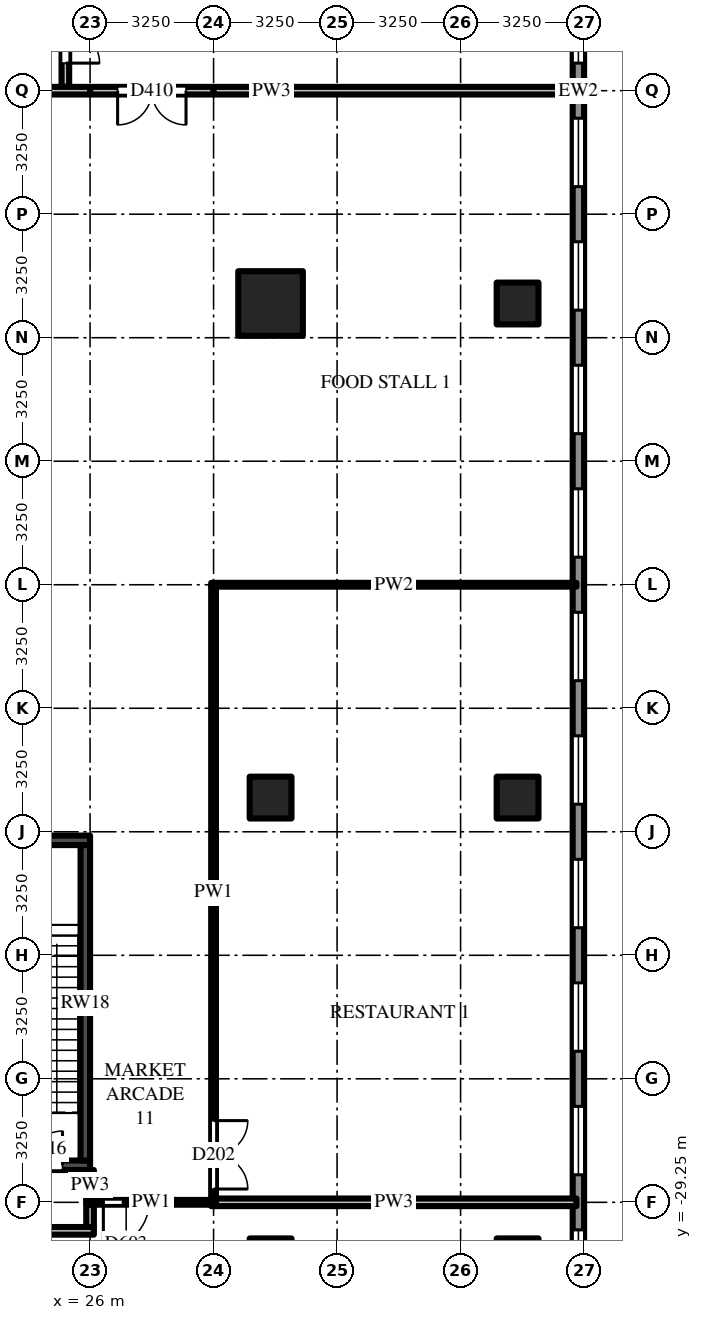
"""IFC4 building model, lengths in metres.
Left out: names, types, materials, properties, quantities, classifications, styles, units other than length and angle.
Written with IfcOpenShell. Run it as: python <this file> out.ifc"""

import sys

from ifc_helpers import new_model, si_unit, direction, frame, frame_2d, origin, origin_2d, place, context, subcontext, project, spatial, rectangle, extrude, source, transform, mapped, element, fill, save


model = new_model("IFC4")
c1 = context("Model", 3, precision=1e-05, world=origin(), true_north=direction((0.0, 1.0)))
c2 = subcontext(c1, "Body", "Model", "MODEL_VIEW")
j1 = project(units=[si_unit("LENGTHUNIT", "METRE"), si_unit("PLANEANGLEUNIT", "RADIAN")], contexts=[c1])
p1 = place(None, origin())
s1 = spatial("IfcSite", under=j1, at=p1, CompositionType="ELEMENT")
p2 = place(p1, origin())
s2 = spatial("IfcBuilding", under=s1, at=p2, CompositionType="ELEMENT")
p3 = place(p2, frame((0.0, 0.0, 14.0)))
s3 = spatial("IfcBuildingStorey", under=s2, at=p3, CompositionType="ELEMENT", Elevation=14.0)
m1 = source(origin(), c2, "Body", "SweptSolid", [
    extrude(rectangle(XDim=1.7, YDim=1.7, at=origin_2d()), origin(), (0.0, 0.0, 1.0), 5.0),
])
p4 = place(p3, frame((30.75, -5.6, 0.0), z_axis=(0.0, 0.0, 1.0), x_axis=(1.0, 0.0, 0.0)))
e1 = element("IfcColumn", 1, at=p4, inside=s3, PredefinedType="COLUMN", context=c2, shape_type="MappedRepresentation", body=[
    mapped(m1, transform((0.0, 0.0, 0.0))),
])
m2 = source(origin(), c2, "Body", "SweptSolid", [
    extrude(rectangle(XDim=1.1, YDim=1.1, at=origin_2d()), origin(), (0.0, 0.0, 1.0), 5.0),
])
for number, where, z_axis, x_axis in (
    (2, (30.75, -18.6, 0.0), (0.0, 0.0, 1.0), (1.0, 0.0, 0.0)),
    (3, (30.75, -30.75, 0.0), (0.0, 0.0, 1.0), (1.0, 0.0, 0.0)),
    (4, (37.25, -5.6, 0.0), (0.0, 0.0, 1.0), (1.0, 0.0, 0.0)),
    (5, (37.25, -18.6, 0.0), (0.0, 0.0, 1.0), (1.0, 0.0, 0.0)),
    (6, (37.25, -30.75, 0.0), (0.0, 0.0, 1.0), (1.0, 0.0, 0.0)),
):
    element("IfcColumn", number, at=place(p3, frame(where, z_axis=z_axis, x_axis=x_axis)), inside=s3, PredefinedType="COLUMN", context=c2, shape_type="MappedRepresentation", body=[
        mapped(m2, transform((0.0, 0.0, 0.0))),
    ])
m3 = source(origin(), c2, "Body", "SweptSolid", [
    extrude(rectangle(XDim=6.5, YDim=0.25, at=frame_2d((3.25, 0.0))), origin(), (0.0, 0.0, 1.0), 4.7),
])
p5 = place(p3, frame((19.5, -28.275, 0.0), z_axis=(0.0, 0.0, 1.0), x_axis=(1.0, 0.0, 0.0)))
e7 = element("IfcWall", 7, at=p5, inside=s3, PredefinedType="SHEAR", context=c2, shape_type="MappedRepresentation", body=[
    mapped(m3, transform((0.0, 0.0, 0.0))),
])
m4 = source(origin(), c2, "Body", "SweptSolid", [
    extrude(rectangle(XDim=1.8, YDim=2.1, at=frame_2d((0.9, 1.05))), frame((0.0, 0.135, 0.0), z_axis=(0.0, -1.0, 0.0), x_axis=(1.0, 0.0, 0.0)), (0.0, 0.0, 1.0), 0.27),
])
p6 = place(p5, frame((0.725, 0.0, 0.0)))
e8 = element("IfcOpeningElement", 8, at=p6, cuts=e7, PredefinedType="OPENING", context=c2, shape_type="MappedRepresentation", body=[
    mapped(m4, transform((0.0, 0.0, 0.0))),
])
p7 = place(p5, frame((3.975, 0.0, 0.0)))
e9 = element("IfcOpeningElement", 9, at=p7, cuts=e7, PredefinedType="OPENING", context=c2, shape_type="MappedRepresentation", body=[
    mapped(m4, transform((0.0, 0.0, 0.0))),
])
p8 = place(p3, frame((19.5, -19.725, 0.0), z_axis=(0.0, 0.0, 1.0), x_axis=(1.0, 0.0, 0.0)))
e10 = element("IfcWall", 10, at=p8, inside=s3, PredefinedType="SHEAR", context=c2, shape_type="MappedRepresentation", body=[
    mapped(m3, transform((0.0, 0.0, 0.0))),
])
m5 = source(origin(), c2, "Body", "SweptSolid", [
    extrude(rectangle(XDim=8.3, YDim=0.25, at=frame_2d((4.15, 0.0))), origin(), (0.0, 0.0, 1.0), 4.7),
])
p9 = place(p3, frame((25.875, -28.15, 0.0), z_axis=(0.0, 0.0, 1.0), x_axis=(0.0, 1.0, 0.0)))
e11 = element("IfcWall", 11, at=p9, inside=s3, PredefinedType="SHEAR", context=c2, shape_type="MappedRepresentation", body=[
    mapped(m5, transform((0.0, 0.0, 0.0))),
])
m6 = source(origin(), c2, "Body", "SweptSolid", [
    extrude(rectangle(XDim=71.5, YDim=0.3, at=frame_2d((35.75, 0.0))), origin(), (0.0, 0.0, 1.0), 4.7),
])
p10 = place(p3, frame((38.85, -35.75, 0.0), z_axis=(0.0, 0.0, 1.0), x_axis=(0.0, 1.0, 0.0)))
e12 = element("IfcWall", 12, at=p10, inside=s3, PredefinedType="SOLIDWALL", context=c2, shape_type="MappedRepresentation", body=[
    mapped(m6, transform((0.0, 0.0, 0.0))),
])
m7 = source(origin(), c2, "Body", "SweptSolid", [
    extrude(rectangle(XDim=1.8, YDim=3.0, at=frame_2d((0.9, 1.5))), frame((0.0, 0.16, 0.0), z_axis=(0.0, -1.0, 0.0), x_axis=(1.0, 0.0, 0.0)), (0.0, 0.0, 1.0), 0.32),
])
p11 = place(p10, frame((0.725, 0.0, 0.9)))
e13 = element("IfcOpeningElement", 13, at=p11, cuts=e12, PredefinedType="OPENING", context=c2, shape_type="MappedRepresentation", body=[
    mapped(m7, transform((0.0, 0.0, 0.0))),
])
p12 = place(p10, frame((3.975, 0.0, 0.9)))
e14 = element("IfcOpeningElement", 14, at=p12, cuts=e12, PredefinedType="OPENING", context=c2, shape_type="MappedRepresentation", body=[
    mapped(m7, transform((0.0, 0.0, 0.0))),
])
p13 = place(p10, frame((7.225, 0.0, 0.9)))
e15 = element("IfcOpeningElement", 15, at=p13, cuts=e12, PredefinedType="OPENING", context=c2, shape_type="MappedRepresentation", body=[
    mapped(m7, transform((0.0, 0.0, 0.0))),
])
p14 = place(p10, frame((10.475, 0.0, 0.9)))
e16 = element("IfcOpeningElement", 16, at=p14, cuts=e12, PredefinedType="OPENING", context=c2, shape_type="MappedRepresentation", body=[
    mapped(m7, transform((0.0, 0.0, 0.0))),
])
p15 = place(p10, frame((13.725, 0.0, 0.9)))
e17 = element("IfcOpeningElement", 17, at=p15, cuts=e12, PredefinedType="OPENING", context=c2, shape_type="MappedRepresentation", body=[
    mapped(m7, transform((0.0, 0.0, 0.0))),
])
p16 = place(p10, frame((16.975, 0.0, 0.9)))
e18 = element("IfcOpeningElement", 18, at=p16, cuts=e12, PredefinedType="OPENING", context=c2, shape_type="MappedRepresentation", body=[
    mapped(m7, transform((0.0, 0.0, 0.0))),
])
p17 = place(p10, frame((20.225, 0.0, 0.9)))
e19 = element("IfcOpeningElement", 19, at=p17, cuts=e12, PredefinedType="OPENING", context=c2, shape_type="MappedRepresentation", body=[
    mapped(m7, transform((0.0, 0.0, 0.0))),
])
p18 = place(p10, frame((23.475, 0.0, 0.9)))
e20 = element("IfcOpeningElement", 20, at=p18, cuts=e12, PredefinedType="OPENING", context=c2, shape_type="MappedRepresentation", body=[
    mapped(m7, transform((0.0, 0.0, 0.0))),
])
p19 = place(p10, frame((26.725, 0.0, 0.9)))
e21 = element("IfcOpeningElement", 21, at=p19, cuts=e12, PredefinedType="OPENING", context=c2, shape_type="MappedRepresentation", body=[
    mapped(m7, transform((0.0, 0.0, 0.0))),
])
p20 = place(p10, frame((29.975, 0.0, 0.9)))
e22 = element("IfcOpeningElement", 22, at=p20, cuts=e12, PredefinedType="OPENING", context=c2, shape_type="MappedRepresentation", body=[
    mapped(m7, transform((0.0, 0.0, 0.0))),
])
p21 = place(p10, frame((33.225, 0.0, 0.9)))
e23 = element("IfcOpeningElement", 23, at=p21, cuts=e12, PredefinedType="OPENING", context=c2, shape_type="MappedRepresentation", body=[
    mapped(m7, transform((0.0, 0.0, 0.0))),
])
p22 = place(p10, frame((36.475, 0.0, 0.9)))
e24 = element("IfcOpeningElement", 24, at=p22, cuts=e12, PredefinedType="OPENING", context=c2, shape_type="MappedRepresentation", body=[
    mapped(m7, transform((0.0, 0.0, 0.0))),
])
p23 = place(p10, frame((39.725, 0.0, 0.9)))
e25 = element("IfcOpeningElement", 25, at=p23, cuts=e12, PredefinedType="OPENING", context=c2, shape_type="MappedRepresentation", body=[
    mapped(m7, transform((0.0, 0.0, 0.0))),
])
p24 = place(p10, frame((42.975, 0.0, 0.9)))
e26 = element("IfcOpeningElement", 26, at=p24, cuts=e12, PredefinedType="OPENING", context=c2, shape_type="MappedRepresentation", body=[
    mapped(m7, transform((0.0, 0.0, 0.0))),
])
p25 = place(p10, frame((46.225, 0.0, 0.9)))
e27 = element("IfcOpeningElement", 27, at=p25, cuts=e12, PredefinedType="OPENING", context=c2, shape_type="MappedRepresentation", body=[
    mapped(m7, transform((0.0, 0.0, 0.0))),
])
p26 = place(p10, frame((49.475, 0.0, 0.9)))
e28 = element("IfcOpeningElement", 28, at=p26, cuts=e12, PredefinedType="OPENING", context=c2, shape_type="MappedRepresentation", body=[
    mapped(m7, transform((0.0, 0.0, 0.0))),
])
p27 = place(p10, frame((52.725, 0.0, 0.9)))
e29 = element("IfcOpeningElement", 29, at=p27, cuts=e12, PredefinedType="OPENING", context=c2, shape_type="MappedRepresentation", body=[
    mapped(m7, transform((0.0, 0.0, 0.0))),
])
p28 = place(p10, frame((55.975, 0.0, 0.9)))
e30 = element("IfcOpeningElement", 30, at=p28, cuts=e12, PredefinedType="OPENING", context=c2, shape_type="MappedRepresentation", body=[
    mapped(m7, transform((0.0, 0.0, 0.0))),
])
p29 = place(p10, frame((59.225, 0.0, 0.9)))
e31 = element("IfcOpeningElement", 31, at=p29, cuts=e12, PredefinedType="OPENING", context=c2, shape_type="MappedRepresentation", body=[
    mapped(m7, transform((0.0, 0.0, 0.0))),
])
p30 = place(p10, frame((62.475, 0.0, 0.9)))
e32 = element("IfcOpeningElement", 32, at=p30, cuts=e12, PredefinedType="OPENING", context=c2, shape_type="MappedRepresentation", body=[
    mapped(m7, transform((0.0, 0.0, 0.0))),
])
p31 = place(p10, frame((65.725, 0.0, 0.9)))
e33 = element("IfcOpeningElement", 33, at=p31, cuts=e12, PredefinedType="OPENING", context=c2, shape_type="MappedRepresentation", body=[
    mapped(m7, transform((0.0, 0.0, 0.0))),
])
p32 = place(p10, frame((68.975, 0.0, 0.9)))
e34 = element("IfcOpeningElement", 34, at=p32, cuts=e12, PredefinedType="OPENING", context=c2, shape_type="MappedRepresentation", body=[
    mapped(m7, transform((0.0, 0.0, 0.0))),
])
m8 = source(origin(), c2, "Body", "SweptSolid", [
    extrude(rectangle(XDim=3.05, YDim=0.2, at=frame_2d((1.525, 0.0))), origin(), (0.0, 0.0, 1.0), 4.077),
])
p33 = place(p3, frame((25.35, 3.15, 0.0), z_axis=(0.0, 0.0, 1.0), x_axis=(0.0, -1.0, 0.0)))
e35 = element("IfcWall", 35, at=p33, inside=s3, PredefinedType="PARTITIONING", context=c2, shape_type="MappedRepresentation", body=[
    mapped(m8, transform((0.0, 0.0, 0.0))),
])
m9 = source(origin(), c2, "Body", "SweptSolid", [
    extrude(rectangle(XDim=1.8, YDim=2.1, at=frame_2d((0.9, 1.05))), frame((0.0, 0.11, 0.0), z_axis=(0.0, -1.0, 0.0), x_axis=(1.0, 0.0, 0.0)), (0.0, 0.0, 1.0), 0.22),
])
p34 = place(p33, frame((0.625, 0.0, 0.0)))
e36 = element("IfcOpeningElement", 36, at=p34, cuts=e35, PredefinedType="OPENING", context=c2, shape_type="MappedRepresentation", body=[
    mapped(m9, transform((0.0, 0.0, 0.0))),
])
m10 = source(origin(), c2, "Body", "SweptSolid", [
    extrude(rectangle(XDim=0.788, YDim=0.2, at=frame_2d((0.394, 0.0))), origin(), (0.0, 0.0, 1.0), 4.7),
])
p35 = place(p3, frame((26.0, -29.188, 0.0), z_axis=(0.0, 0.0, 1.0), x_axis=(0.0, 1.0, 0.0)))
e37 = element("IfcWall", 37, at=p35, inside=s3, PredefinedType="PARTITIONING", context=c2, shape_type="MappedRepresentation", body=[
    mapped(m10, transform((0.0, 0.0, 0.0))),
])
m11 = source(origin(), c2, "Body", "SweptSolid", [
    extrude(rectangle(XDim=0.587, YDim=0.2, at=frame_2d((0.294, 0.0))), origin(), (0.0, 0.0, 1.0), 4.7),
])
p36 = place(p3, frame((26.0, -29.312, 0.0), z_axis=(0.0, 0.0, 1.0), x_axis=(0.0, -1.0, 0.0)))
e38 = element("IfcWall", 38, at=p36, inside=s3, PredefinedType="PARTITIONING", context=c2, shape_type="MappedRepresentation", body=[
    mapped(m11, transform((0.0, 0.0, 0.0))),
])
p37 = place(p3, frame((29.25, -13.05, 0.0), z_axis=(0.0, 0.0, 1.0), x_axis=(0.0, -1.0, 0.0)))
e39 = element("IfcWall", 39, at=p37, inside=s3, PredefinedType="PARTITIONING", context=c2, shape_type="SweptSolid", body=[
    extrude(rectangle(XDim=16.1, YDim=0.125, at=frame_2d((8.05, 0.0))), origin(), (0.0, 0.0, 1.0), 3.762),
])
m12 = source(origin(), c2, "Body", "SweptSolid", [
    extrude(rectangle(XDim=1.8, YDim=2.1, at=frame_2d((0.9, 1.05))), frame((0.0, 0.073, 0.0), z_axis=(0.0, -1.0, 0.0), x_axis=(1.0, 0.0, 0.0)), (0.0, 0.0, 1.0), 0.145),
])
p38 = place(p37, frame((14.05, 0.0, 0.0)))
e40 = element("IfcOpeningElement", 40, at=p38, cuts=e39, PredefinedType="OPENING", context=c2, shape_type="MappedRepresentation", body=[
    mapped(m12, transform((0.0, 0.0, 0.0))),
])
m13 = source(origin(), c2, "Body", "SweptSolid", [
    extrude(rectangle(XDim=8.2, YDim=0.2, at=frame_2d((4.1, 0.0))), origin(), (0.0, 0.0, 1.0), 3.762),
])
p39 = place(p3, frame((26.1, -30.0, 0.0), z_axis=(0.0, 0.0, 1.0), x_axis=(-1.0, 0.0, 0.0)))
e41 = element("IfcWall", 41, at=p39, inside=s3, PredefinedType="PARTITIONING", context=c2, shape_type="MappedRepresentation", body=[
    mapped(m13, transform((0.0, 0.0, 0.0))),
])
m14 = source(origin(), c2, "Body", "SweptSolid", [
    extrude(rectangle(XDim=9.613, YDim=0.2, at=frame_2d((4.806, 0.0))), origin(), (0.0, 0.0, 1.0), 3.762),
])
p40 = place(p3, frame((29.188, -29.25, 0.0), z_axis=(0.0, 0.0, 1.0), x_axis=(1.0, 0.0, 0.0)))
e42 = element("IfcWall", 42, at=p40, inside=s3, PredefinedType="PARTITIONING", context=c2, shape_type="MappedRepresentation", body=[
    mapped(m14, transform((0.0, 0.0, 0.0))),
])
m15 = source(origin(), c2, "Body", "SweptSolid", [
    extrude(rectangle(XDim=3.413, YDim=0.125, at=frame_2d((1.706, 0.0))), origin(), (0.0, 0.0, 1.0), 4.7),
])
p41 = place(p3, frame((29.312, -29.25, 0.0), z_axis=(0.0, 0.0, 1.0), x_axis=(-1.0, 0.0, 0.0)))
e43 = element("IfcWall", 43, at=p41, inside=s3, PredefinedType="PARTITIONING", context=c2, shape_type="MappedRepresentation", body=[
    mapped(m15, transform((0.0, 0.0, 0.0))),
])
m16 = source(origin(), c2, "Body", "SweptSolid", [
    extrude(rectangle(XDim=1.2, YDim=2.1, at=frame_2d((0.6, 1.05))), frame((0.0, 0.073, 0.0), z_axis=(0.0, -1.0, 0.0), x_axis=(1.0, 0.0, 0.0)), (0.0, 0.0, 1.0), 0.145),
])
p42 = place(p41, frame((1.762, 0.0, 0.0)))
e44 = element("IfcOpeningElement", 44, at=p42, cuts=e43, PredefinedType="OPENING", context=c2, shape_type="MappedRepresentation", body=[
    mapped(m16, transform((0.0, 0.0, 0.0))),
])
m17 = source(origin(), c2, "Body", "SweptSolid", [
    extrude(rectangle(XDim=9.613, YDim=0.1, at=frame_2d((4.806, 0.0))), origin(), (0.0, 0.0, 1.0), 3.762),
])
p43 = place(p3, frame((29.188, -13.0, 0.0), z_axis=(0.0, 0.0, 1.0), x_axis=(1.0, 0.0, 0.0)))
e45 = element("IfcWall", 45, at=p43, inside=s3, PredefinedType="PARTITIONING", context=c2, shape_type="MappedRepresentation", body=[
    mapped(m17, transform((0.0, 0.0, 0.0))),
])
m18 = source(origin(), c2, "Body", "SweptSolid", [
    extrude(rectangle(XDim=3.25, YDim=0.2, at=frame_2d((1.625, 0.0))), origin(), (0.0, 0.0, 1.0), 4.077),
])
p44 = place(p3, frame((29.25, 0.0, 0.0), z_axis=(0.0, 0.0, 1.0), x_axis=(-1.0, 0.0, 0.0)))
e46 = element("IfcWall", 46, at=p44, inside=s3, PredefinedType="PARTITIONING", context=c2, shape_type="MappedRepresentation", body=[
    mapped(m18, transform((0.0, 0.0, 0.0))),
])
p45 = place(p44, frame((0.725, 0.0, 0.0)))
e47 = element("IfcOpeningElement", 47, at=p45, cuts=e46, PredefinedType="OPENING", context=c2, shape_type="MappedRepresentation", body=[
    mapped(m9, transform((0.0, 0.0, 0.0))),
])
m19 = source(origin(), c2, "Body", "SweptSolid", [
    extrude(rectangle(XDim=2.0, YDim=0.2, at=frame_2d((1.0, 0.0))), origin(), (0.0, 0.0, 1.0), 4.077),
])
p46 = place(p3, frame((26.0, 0.0, 0.0), z_axis=(0.0, 0.0, 1.0), x_axis=(-1.0, 0.0, 0.0)))
e48 = element("IfcWall", 48, at=p46, inside=s3, PredefinedType="PARTITIONING", context=c2, shape_type="MappedRepresentation", body=[
    mapped(m19, transform((0.0, 0.0, 0.0))),
])
m20 = source(origin(), c2, "Body", "SweptSolid", [
    extrude(rectangle(XDim=9.55, YDim=0.2, at=frame_2d((4.775, 0.0))), origin(), (0.0, 0.0, 1.0), 3.918),
])
p47 = place(p3, frame((38.8, 0.0, 0.0), z_axis=(0.0, 0.0, 1.0), x_axis=(-1.0, 0.0, 0.0)))
e49 = element("IfcWall", 49, at=p47, inside=s3, PredefinedType="PARTITIONING", context=c2, shape_type="MappedRepresentation", body=[
    mapped(m20, transform((0.0, 0.0, 0.0))),
])
m21 = source(origin(), c2, "Body", "SweptSolid", [
    extrude(rectangle(XDim=1.8, YDim=2.1, at=frame_2d((0.9, 1.05))), frame((0.0, 0.025, 0.0), z_axis=(0.0, -1.0, 0.0), x_axis=(1.0, 0.0, 0.0)), (0.0, 0.0, 1.0), 0.05),
])
p48 = place(p7, origin())
e50 = element("IfcDoor", 50, at=p48, inside=s3, OperationType="DOUBLE_DOOR_SINGLE_SWING", PredefinedType="DOOR", context=c2, shape_type="MappedRepresentation", body=[
    mapped(m21, transform((0.0, 0.0, 0.0))),
])
fill(e9, e50)
m22 = source(origin(), c2, "Body", "SweptSolid", [
    extrude(rectangle(XDim=1.8, YDim=3.0, at=frame_2d((0.9, 1.5))), frame((0.0, 0.03, 0.0), z_axis=(0.0, -1.0, 0.0), x_axis=(1.0, 0.0, 0.0)), (0.0, 0.0, 1.0), 0.06),
])
p49 = place(p12, origin())
e51 = element("IfcWindow", 51, at=p49, inside=s3, PartitioningType="SINGLE_PANEL", PredefinedType="WINDOW", context=c2, shape_type="MappedRepresentation", body=[
    mapped(m22, transform((0.0, 0.0, 0.0))),
])
fill(e14, e51)
p50 = place(p13, origin())
e52 = element("IfcWindow", 52, at=p50, inside=s3, PartitioningType="SINGLE_PANEL", PredefinedType="WINDOW", context=c2, shape_type="MappedRepresentation", body=[
    mapped(m22, transform((0.0, 0.0, 0.0))),
])
fill(e15, e52)
p51 = place(p14, origin())
e53 = element("IfcWindow", 53, at=p51, inside=s3, PartitioningType="SINGLE_PANEL", PredefinedType="WINDOW", context=c2, shape_type="MappedRepresentation", body=[
    mapped(m22, transform((0.0, 0.0, 0.0))),
])
fill(e16, e53)
p52 = place(p15, origin())
e54 = element("IfcWindow", 54, at=p52, inside=s3, PartitioningType="SINGLE_PANEL", PredefinedType="WINDOW", context=c2, shape_type="MappedRepresentation", body=[
    mapped(m22, transform((0.0, 0.0, 0.0))),
])
fill(e17, e54)
p53 = place(p16, origin())
e55 = element("IfcWindow", 55, at=p53, inside=s3, PartitioningType="SINGLE_PANEL", PredefinedType="WINDOW", context=c2, shape_type="MappedRepresentation", body=[
    mapped(m22, transform((0.0, 0.0, 0.0))),
])
fill(e18, e55)
p54 = place(p17, origin())
e56 = element("IfcWindow", 56, at=p54, inside=s3, PartitioningType="SINGLE_PANEL", PredefinedType="WINDOW", context=c2, shape_type="MappedRepresentation", body=[
    mapped(m22, transform((0.0, 0.0, 0.0))),
])
fill(e19, e56)
p55 = place(p18, origin())
e57 = element("IfcWindow", 57, at=p55, inside=s3, PartitioningType="SINGLE_PANEL", PredefinedType="WINDOW", context=c2, shape_type="MappedRepresentation", body=[
    mapped(m22, transform((0.0, 0.0, 0.0))),
])
fill(e20, e57)
p56 = place(p19, origin())
e58 = element("IfcWindow", 58, at=p56, inside=s3, PartitioningType="SINGLE_PANEL", PredefinedType="WINDOW", context=c2, shape_type="MappedRepresentation", body=[
    mapped(m22, transform((0.0, 0.0, 0.0))),
])
fill(e21, e58)
p57 = place(p20, origin())
e59 = element("IfcWindow", 59, at=p57, inside=s3, PartitioningType="SINGLE_PANEL", PredefinedType="WINDOW", context=c2, shape_type="MappedRepresentation", body=[
    mapped(m22, transform((0.0, 0.0, 0.0))),
])
fill(e22, e59)
p58 = place(p21, origin())
e60 = element("IfcWindow", 60, at=p58, inside=s3, PartitioningType="SINGLE_PANEL", PredefinedType="WINDOW", context=c2, shape_type="MappedRepresentation", body=[
    mapped(m22, transform((0.0, 0.0, 0.0))),
])
fill(e23, e60)
p59 = place(p22, origin())
e61 = element("IfcWindow", 61, at=p59, inside=s3, PartitioningType="SINGLE_PANEL", PredefinedType="WINDOW", context=c2, shape_type="MappedRepresentation", body=[
    mapped(m22, transform((0.0, 0.0, 0.0))),
])
fill(e24, e61)
m23 = source(origin(), c2, "Body", "SweptSolid", [
    extrude(rectangle(XDim=1.2, YDim=2.1, at=frame_2d((0.6, 1.05))), frame((0.0, 0.025, 0.0), z_axis=(0.0, -1.0, 0.0), x_axis=(1.0, 0.0, 0.0)), (0.0, 0.0, 1.0), 0.05),
])
p60 = place(p42, origin())
e62 = element("IfcDoor", 62, at=p60, inside=s3, OperationType="SINGLE_SWING_RIGHT", PredefinedType="DOOR", context=c2, shape_type="MappedRepresentation", body=[
    mapped(m23, transform((0.0, 0.0, 0.0))),
])
fill(e44, e62)
p61 = place(p38, origin())
e63 = element("IfcDoor", 63, at=p61, inside=s3, OperationType="DOUBLE_DOOR_SINGLE_SWING", PredefinedType="DOOR", context=c2, shape_type="MappedRepresentation", body=[
    mapped(m21, transform((0.0, 0.0, 0.0))),
])
fill(e40, e63)
p62 = place(p45, origin())
e64 = element("IfcDoor", 64, at=p62, inside=s3, OperationType="DOUBLE_DOOR_SINGLE_SWING", PredefinedType="DOOR", context=c2, shape_type="MappedRepresentation", body=[
    mapped(m21, transform((0.0, 0.0, 0.0))),
])
fill(e47, e64)
p63 = place(p34, origin())
e65 = element("IfcDoor", 65, at=p63, inside=s3, OperationType="DOUBLE_DOOR_SINGLE_SWING", PredefinedType="DOOR", context=c2, shape_type="MappedRepresentation", body=[
    mapped(m21, transform((0.0, 0.0, 0.0))),
])
fill(e36, e65)
save(model, sys.argv[1])
